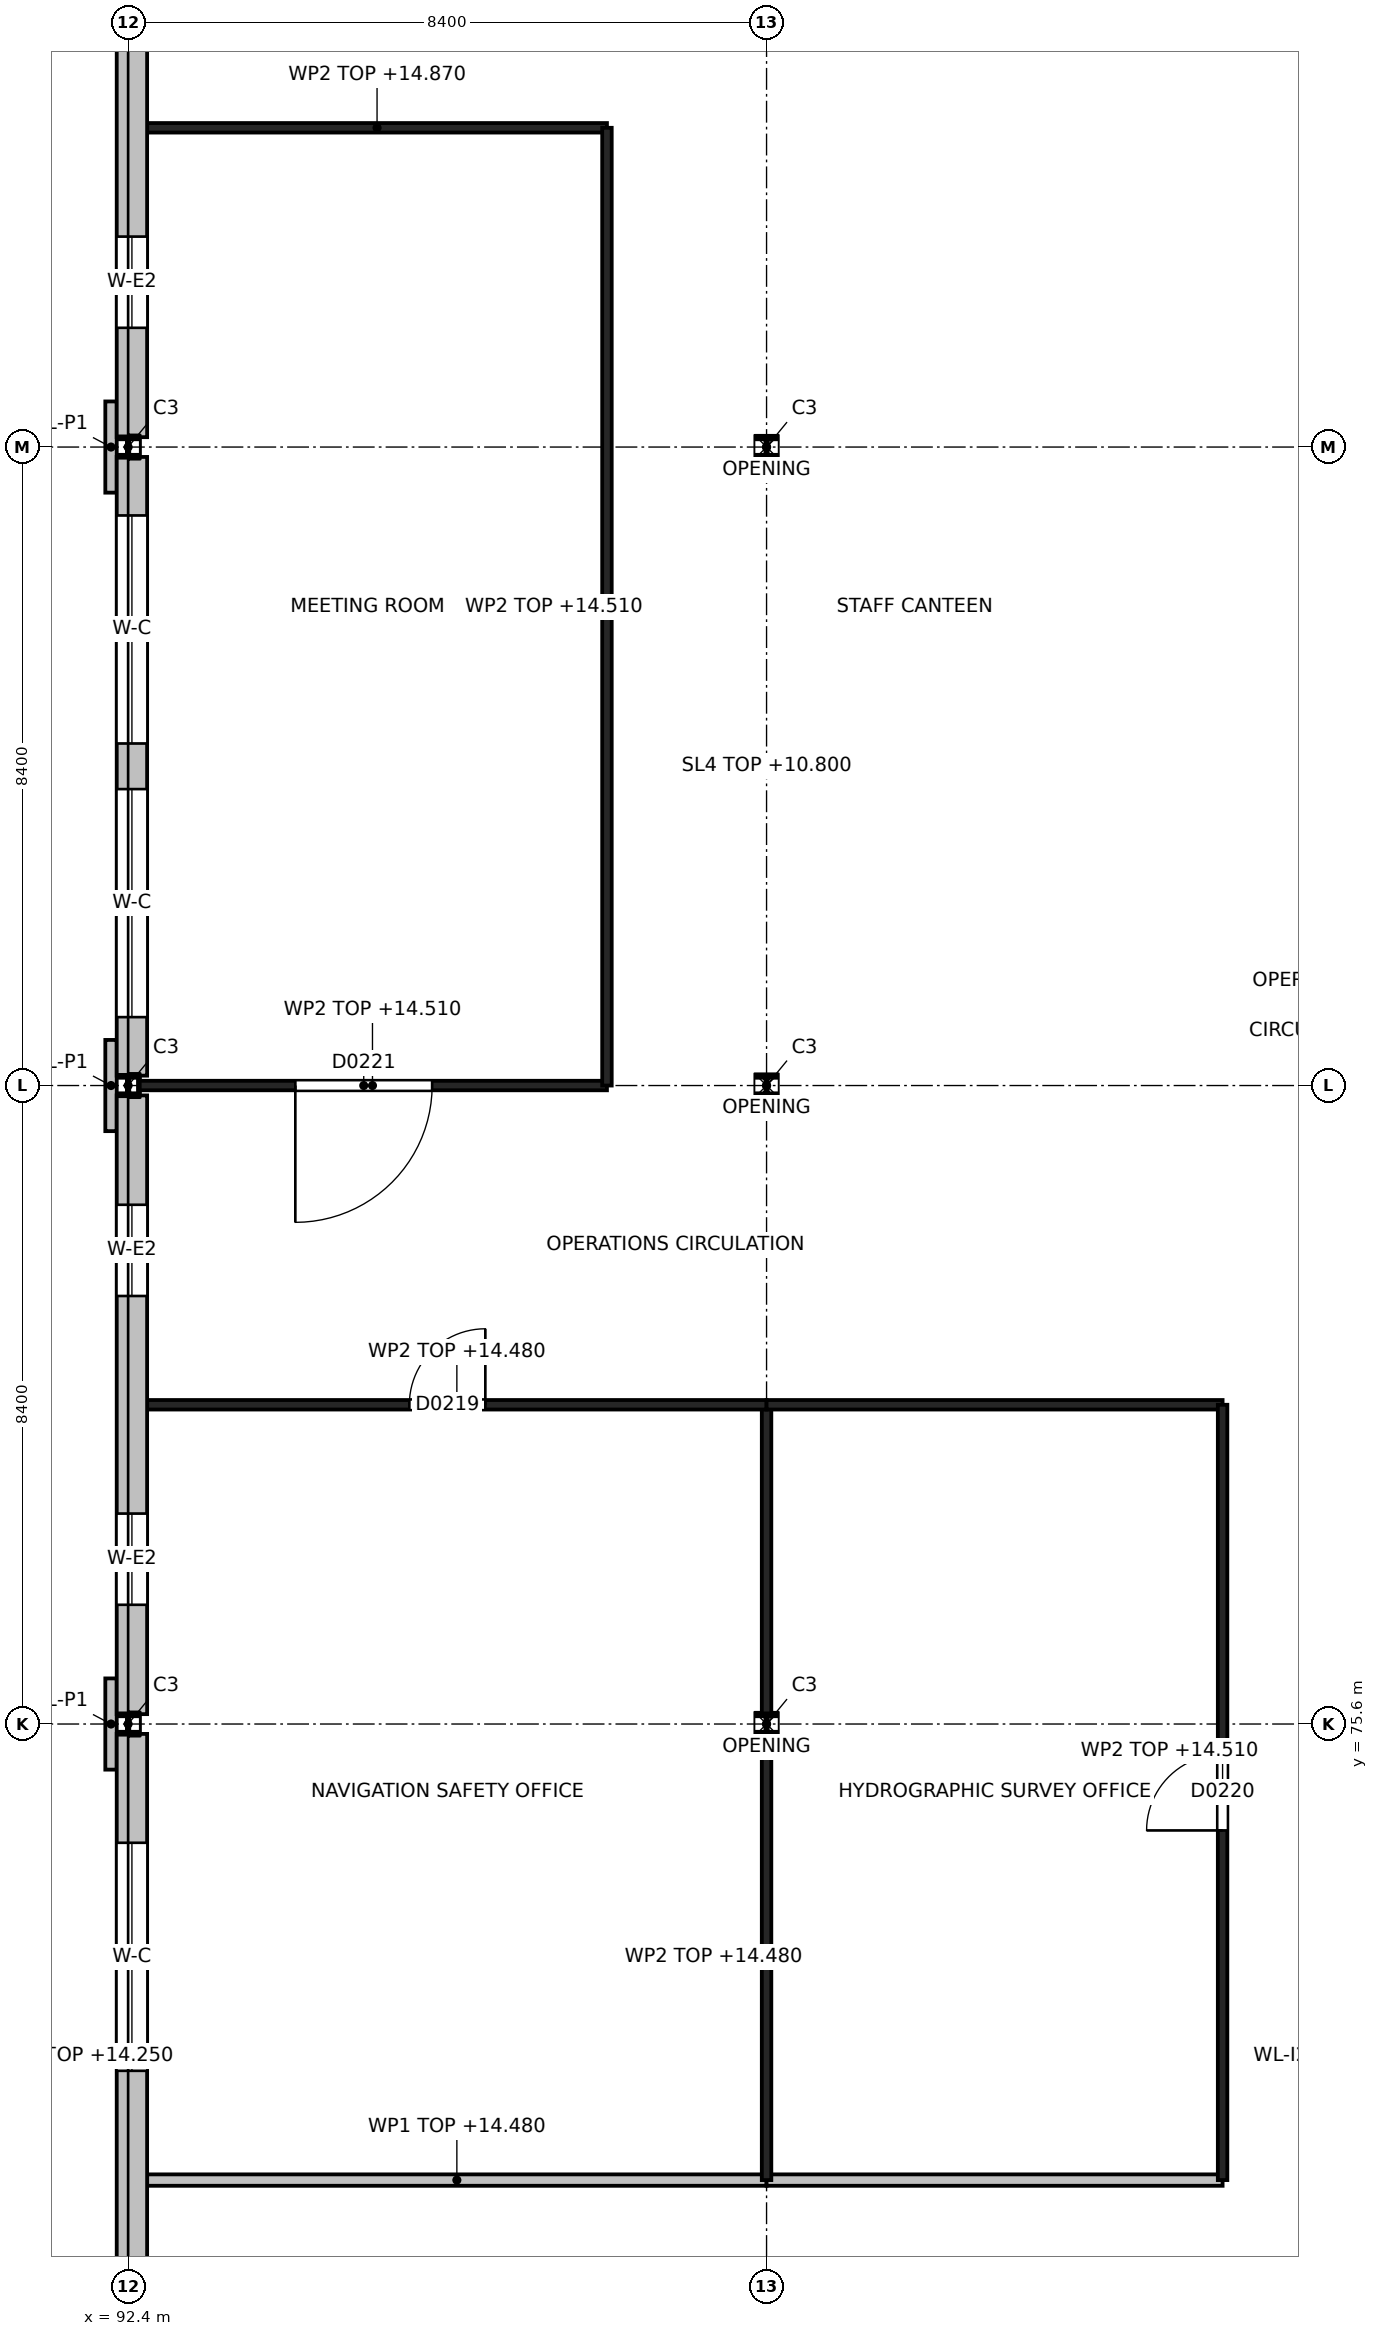
"""IFC4 building model, lengths in metres.
Left out: names, types, materials, properties, quantities, classifications, styles, units other than length and angle.
Written with IfcOpenShell. Run it as: python <this file> out.ifc"""

import sys

from ifc_helpers import new_model, si_unit, direction, frame, frame_2d, origin, origin_2d, place, context, subcontext, project, spatial, rectangle, i_section, extrude, element, fill, save


model = new_model("IFC4")
c1 = context("Model", 3, precision=1e-05, world=origin(), true_north=direction((0.0, 1.0)))
c2 = subcontext(c1, "Body", "Model", "MODEL_VIEW")
j1 = project(units=[si_unit("LENGTHUNIT", "METRE"), si_unit("PLANEANGLEUNIT", "RADIAN")], contexts=[c1])
p1 = place(None, origin())
s1 = spatial("IfcSite", under=j1, at=p1, CompositionType="ELEMENT")
p2 = place(p1, origin())
s2 = spatial("IfcBuilding", under=s1, at=p2, CompositionType="ELEMENT")
p3 = place(p2, frame((0.0, 0.0, 10.8)))
s3 = spatial("IfcBuildingStorey", under=s2, at=p3, CompositionType="ELEMENT", Elevation=10.8)
for number, where, z_axis, x_axis in (
    (1, (92.4, 75.6, 0.0), (0.0, 0.0, 1.0), (1.0, 0.0, 0.0)),
    (2, (92.4, 84.0, 0.0), (0.0, 0.0, 1.0), (1.0, 0.0, 0.0)),
    (3, (92.4, 92.4, 0.0), (0.0, 0.0, 1.0), (1.0, 0.0, 0.0)),
    (4, (100.8, 75.6, 0.0), (0.0, 0.0, 1.0), (1.0, 0.0, 0.0)),
    (5, (100.8, 84.0, 0.0), (0.0, 0.0, 1.0), (1.0, 0.0, 0.0)),
    (6, (100.8, 92.4, 0.0), (0.0, 0.0, 1.0), (1.0, 0.0, 0.0)),
):
    element("IfcColumn", number, at=place(p3, frame(where, z_axis=z_axis, x_axis=x_axis)), inside=s3, PredefinedType="COLUMN", context=c2, shape_type="SweptSolid", body=[
        extrude(i_section(OverallWidth=0.26, OverallDepth=0.26, WebThickness=0.01, FlangeThickness=0.018, at=origin_2d()), origin(), (0.0, 0.0, 1.0), 4.2),
    ])
p4 = place(p3, frame((92.45, 67.0, 0.0), z_axis=(0.0, 0.0, 1.0), x_axis=(0.0, 1.0, 0.0)))
e7 = element("IfcWall", 7, at=p4, inside=s3, PredefinedType="SOLIDWALL", context=c2, shape_type="SweptSolid", body=[
    extrude(rectangle(XDim=8.47, YDim=0.4, at=frame_2d((4.235, 0.0))), origin(), (0.0, 0.0, 1.0), 3.45),
])
p5 = place(p4, frame((4.038, 0.0, 0.9)))
e8 = element("IfcOpeningElement", 8, at=p5, cuts=e7, PredefinedType="OPENING", context=c2, shape_type="SweptSolid", body=[
    extrude(rectangle(XDim=3.0, YDim=2.4, at=frame_2d((1.5, 1.2))), frame((0.0, 0.2, 0.0), z_axis=(0.0, -1.0, 0.0), x_axis=(1.0, 0.0, 0.0)), (0.0, 0.0, 1.0), 0.4),
])
p6 = place(p3, frame((92.45, 75.73, 0.0), z_axis=(0.0, 0.0, 1.0), x_axis=(0.0, 1.0, 0.0)))
e9 = element("IfcWall", 9, at=p6, inside=s3, PredefinedType="SOLIDWALL", context=c2, shape_type="SweptSolid", body=[
    extrude(rectangle(XDim=8.14, YDim=0.4, at=frame_2d((4.07, 0.0))), origin(), (0.0, 0.0, 1.0), 3.45),
])
p7 = place(p6, frame((1.439, 0.0, 0.9)))
e10 = element("IfcOpeningElement", 10, at=p7, cuts=e9, PredefinedType="OPENING", context=c2, shape_type="SweptSolid", body=[
    extrude(rectangle(XDim=1.2, YDim=2.4, at=frame_2d((0.6, 1.2))), frame((0.0, 0.2, 0.0), z_axis=(0.0, -1.0, 0.0), x_axis=(1.0, 0.0, 0.0)), (0.0, 0.0, 1.0), 0.4),
])
p8 = place(p6, frame((5.501, 0.0, 0.9)))
e11 = element("IfcOpeningElement", 11, at=p8, cuts=e9, PredefinedType="OPENING", context=c2, shape_type="SweptSolid", body=[
    extrude(rectangle(XDim=1.2, YDim=2.4, at=frame_2d((0.6, 1.2))), frame((0.0, 0.2, 0.0), z_axis=(0.0, -1.0, 0.0), x_axis=(1.0, 0.0, 0.0)), (0.0, 0.0, 1.0), 0.4),
])
p9 = place(p3, frame((92.45, 84.13, 0.0), z_axis=(0.0, 0.0, 1.0), x_axis=(0.0, 1.0, 0.0)))
e12 = element("IfcWall", 12, at=p9, inside=s3, PredefinedType="SOLIDWALL", context=c2, shape_type="SweptSolid", body=[
    extrude(rectangle(XDim=8.14, YDim=0.4, at=frame_2d((4.07, 0.0))), origin(), (0.0, 0.0, 1.0), 3.45),
])
p10 = place(p9, frame((0.77, 0.0, 0.9)))
e13 = element("IfcOpeningElement", 13, at=p10, cuts=e12, PredefinedType="OPENING", context=c2, shape_type="SweptSolid", body=[
    extrude(rectangle(XDim=3.0, YDim=2.4, at=frame_2d((1.5, 1.2))), frame((0.0, 0.2, 0.0), z_axis=(0.0, -1.0, 0.0), x_axis=(1.0, 0.0, 0.0)), (0.0, 0.0, 1.0), 0.4),
])
p11 = place(p9, frame((4.37, 0.0, 0.9)))
e14 = element("IfcOpeningElement", 14, at=p11, cuts=e12, PredefinedType="OPENING", context=c2, shape_type="SweptSolid", body=[
    extrude(rectangle(XDim=3.0, YDim=2.4, at=frame_2d((1.5, 1.2))), frame((0.0, 0.2, 0.0), z_axis=(0.0, -1.0, 0.0), x_axis=(1.0, 0.0, 0.0)), (0.0, 0.0, 1.0), 0.4),
])
p12 = place(p3, frame((92.45, 92.53, 0.0), z_axis=(0.0, 0.0, 1.0), x_axis=(0.0, 1.0, 0.0)))
e15 = element("IfcWall", 15, at=p12, inside=s3, PredefinedType="SOLIDWALL", context=c2, shape_type="SweptSolid", body=[
    extrude(rectangle(XDim=8.47, YDim=0.4, at=frame_2d((4.235, 0.0))), origin(), (0.0, 0.0, 1.0), 3.45),
])
p13 = place(p12, frame((1.439, 0.0, 0.9)))
e16 = element("IfcOpeningElement", 16, at=p13, cuts=e15, PredefinedType="OPENING", context=c2, shape_type="SweptSolid", body=[
    extrude(rectangle(XDim=1.2, YDim=2.4, at=frame_2d((0.6, 1.2))), frame((0.0, 0.2, 0.0), z_axis=(0.0, -1.0, 0.0), x_axis=(1.0, 0.0, 0.0)), (0.0, 0.0, 1.0), 0.4),
])
p14 = place(p12, frame((5.501, 0.0, 0.9)))
e17 = element("IfcOpeningElement", 17, at=p14, cuts=e15, PredefinedType="OPENING", context=c2, shape_type="SweptSolid", body=[
    extrude(rectangle(XDim=1.2, YDim=2.4, at=frame_2d((0.6, 1.2))), frame((0.0, 0.2, 0.0), z_axis=(0.0, -1.0, 0.0), x_axis=(1.0, 0.0, 0.0)), (0.0, 0.0, 1.0), 0.4),
])
p15 = place(p3, frame((92.175, 75.0, 0.0), z_axis=(0.0, 0.0, 1.0), x_axis=(0.0, 1.0, 0.0)))
e18 = element("IfcWall", 18, at=p15, inside=s3, PredefinedType="SOLIDWALL", context=c2, shape_type="SweptSolid", body=[
    extrude(rectangle(XDim=1.2, YDim=0.15, at=frame_2d((0.6, 0.0))), origin(), (0.0, 0.0, 1.0), 4.2),
])
p16 = place(p3, frame((92.175, 83.4, 0.0), z_axis=(0.0, 0.0, 1.0), x_axis=(0.0, 1.0, 0.0)))
e19 = element("IfcWall", 19, at=p16, inside=s3, PredefinedType="SOLIDWALL", context=c2, shape_type="SweptSolid", body=[
    extrude(rectangle(XDim=1.2, YDim=0.15, at=frame_2d((0.6, 0.0))), origin(), (0.0, 0.0, 1.0), 4.2),
])
p17 = place(p3, frame((92.175, 91.8, 0.0), z_axis=(0.0, 0.0, 1.0), x_axis=(0.0, 1.0, 0.0)))
e20 = element("IfcWall", 20, at=p17, inside=s3, PredefinedType="SOLIDWALL", context=c2, shape_type="SweptSolid", body=[
    extrude(rectangle(XDim=1.2, YDim=0.15, at=frame_2d((0.6, 0.0))), origin(), (0.0, 0.0, 1.0), 4.2),
])
p18 = place(p3, frame((92.65, 69.6, 0.0), z_axis=(0.0, 0.0, 1.0), x_axis=(1.0, 0.0, 0.0)))
e21 = element("IfcWall", 21, at=p18, inside=s3, PredefinedType="PARTITIONING", context=c2, shape_type="SweptSolid", body=[
    extrude(rectangle(XDim=8.15, YDim=0.15, at=frame_2d((4.075, 0.0))), origin(), (0.0, 0.0, 1.0), 3.68),
])
p19 = place(p3, frame((100.8, 69.6, 0.0), z_axis=(0.0, 0.0, 1.0), x_axis=(1.0, 0.0, 0.0)))
e22 = element("IfcWall", 22, at=p19, inside=s3, PredefinedType="PARTITIONING", context=c2, shape_type="SweptSolid", body=[
    extrude(rectangle(XDim=6.0, YDim=0.15, at=frame_2d((3.0, 0.0))), origin(), (0.0, 0.0, 1.0), 3.68),
])
p20 = place(p3, frame((100.8, 69.6, 0.0), z_axis=(0.0, 0.0, 1.0), x_axis=(0.0, 1.0, 0.0)))
e23 = element("IfcWall", 23, at=p20, inside=s3, PredefinedType="PARTITIONING", context=c2, shape_type="SweptSolid", body=[
    extrude(rectangle(XDim=5.87, YDim=0.125, at=frame_2d((2.935, 0.0))), origin(), (0.0, 0.0, 1.0), 3.68),
])
p21 = place(p3, frame((100.8, 75.73, 0.0), z_axis=(0.0, 0.0, 1.0), x_axis=(0.0, 1.0, 0.0)))
e24 = element("IfcWall", 24, at=p21, inside=s3, PredefinedType="PARTITIONING", context=c2, shape_type="SweptSolid", body=[
    extrude(rectangle(XDim=4.07, YDim=0.125, at=frame_2d((2.035, 0.0))), origin(), (0.0, 0.0, 1.0), 3.68),
])
p22 = place(p3, frame((92.65, 79.8, 0.0), z_axis=(0.0, 0.0, 1.0), x_axis=(1.0, 0.0, 0.0)))
e25 = element("IfcWall", 25, at=p22, inside=s3, PredefinedType="PARTITIONING", context=c2, shape_type="SweptSolid", body=[
    extrude(rectangle(XDim=8.15, YDim=0.125, at=frame_2d((4.075, 0.0))), origin(), (0.0, 0.0, 1.0), 3.68),
])
p23 = place(p22, frame((3.449, 0.0, 0.0)))
e26 = element("IfcOpeningElement", 26, at=p23, cuts=e25, PredefinedType="OPENING", context=c2, shape_type="SweptSolid", body=[
    extrude(rectangle(XDim=1.0, YDim=2.2, at=frame_2d((0.5, 1.1))), frame((0.0, 0.062, 0.0), z_axis=(0.0, -1.0, 0.0), x_axis=(1.0, 0.0, 0.0)), (0.0, 0.0, 1.0), 0.125),
])
p24 = place(p3, frame((100.8, 79.8, 0.0), z_axis=(0.0, 0.0, 1.0), x_axis=(1.0, 0.0, 0.0)))
e27 = element("IfcWall", 27, at=p24, inside=s3, PredefinedType="PARTITIONING", context=c2, shape_type="SweptSolid", body=[
    extrude(rectangle(XDim=6.0, YDim=0.125, at=frame_2d((3.0, 0.0))), origin(), (0.0, 0.0, 1.0), 3.68),
])
p25 = place(p3, frame((106.8, 69.6, 0.0), z_axis=(0.0, 0.0, 1.0), x_axis=(0.0, 1.0, 0.0)))
e28 = element("IfcWall", 28, at=p25, inside=s3, PredefinedType="PARTITIONING", context=c2, shape_type="SweptSolid", body=[
    extrude(rectangle(XDim=10.2, YDim=0.125, at=frame_2d((5.1, 0.0))), origin(), (0.0, 0.0, 1.0), 3.71),
])
p26 = place(p25, frame((4.6, 0.0, 0.0)))
e29 = element("IfcOpeningElement", 29, at=p26, cuts=e28, PredefinedType="OPENING", context=c2, shape_type="SweptSolid", body=[
    extrude(rectangle(XDim=1.0, YDim=2.2, at=frame_2d((0.5, 1.1))), frame((0.0, 0.062, 0.0), z_axis=(0.0, -1.0, 0.0), x_axis=(1.0, 0.0, 0.0)), (0.0, 0.0, 1.0), 0.125),
])
p27 = place(p3, frame((92.53, 84.0, 0.0), z_axis=(0.0, 0.0, 1.0), x_axis=(1.0, 0.0, 0.0)))
e30 = element("IfcWall", 30, at=p27, inside=s3, PredefinedType="PARTITIONING", context=c2, shape_type="SweptSolid", body=[
    extrude(rectangle(XDim=6.17, YDim=0.125, at=frame_2d((3.085, 0.0))), origin(), (0.0, 0.0, 1.0), 3.71),
])
p28 = place(p27, frame((2.07, 0.0, 0.0)))
e31 = element("IfcOpeningElement", 31, at=p28, cuts=e30, PredefinedType="OPENING", context=c2, shape_type="SweptSolid", body=[
    extrude(rectangle(XDim=1.8, YDim=2.1, at=frame_2d((0.9, 1.05))), frame((0.0, 0.062, 0.0), z_axis=(0.0, -1.0, 0.0), x_axis=(1.0, 0.0, 0.0)), (0.0, 0.0, 1.0), 0.125),
])
p29 = place(p3, frame((92.65, 96.6, 0.0), z_axis=(0.0, 0.0, 1.0), x_axis=(1.0, 0.0, 0.0)))
e32 = element("IfcWall", 32, at=p29, inside=s3, PredefinedType="PARTITIONING", context=c2, shape_type="SweptSolid", body=[
    extrude(rectangle(XDim=6.05, YDim=0.125, at=frame_2d((3.025, 0.0))), origin(), (0.0, 0.0, 1.0), 4.07),
])
p30 = place(p3, frame((98.7, 84.0, 0.0), z_axis=(0.0, 0.0, 1.0), x_axis=(0.0, 1.0, 0.0)))
e33 = element("IfcWall", 33, at=p30, inside=s3, PredefinedType="PARTITIONING", context=c2, shape_type="SweptSolid", body=[
    extrude(rectangle(XDim=12.6, YDim=0.125, at=frame_2d((6.3, 0.0))), origin(), (0.0, 0.0, 1.0), 3.71),
])
p31 = place(p5, origin())
e34 = element("IfcWindow", 34, at=p31, inside=s3, PartitioningType="SINGLE_PANEL", PredefinedType="WINDOW", context=c2, shape_type="SweptSolid", body=[
    extrude(rectangle(XDim=3.0, YDim=2.4, at=frame_2d((1.5, 1.2))), frame((0.0, 0.03, 0.0), z_axis=(0.0, -1.0, 0.0), x_axis=(1.0, 0.0, 0.0)), (0.0, 0.0, 1.0), 0.06),
])
fill(e8, e34)
p32 = place(p7, origin())
e35 = element("IfcWindow", 35, at=p32, inside=s3, PartitioningType="SINGLE_PANEL", PredefinedType="WINDOW", context=c2, shape_type="SweptSolid", body=[
    extrude(rectangle(XDim=1.2, YDim=2.4, at=frame_2d((0.6, 1.2))), frame((0.0, 0.03, 0.0), z_axis=(0.0, -1.0, 0.0), x_axis=(1.0, 0.0, 0.0)), (0.0, 0.0, 1.0), 0.06),
])
fill(e10, e35)
p33 = place(p8, origin())
e36 = element("IfcWindow", 36, at=p33, inside=s3, PartitioningType="SINGLE_PANEL", PredefinedType="WINDOW", context=c2, shape_type="SweptSolid", body=[
    extrude(rectangle(XDim=1.2, YDim=2.4, at=frame_2d((0.6, 1.2))), frame((0.0, 0.03, 0.0), z_axis=(0.0, -1.0, 0.0), x_axis=(1.0, 0.0, 0.0)), (0.0, 0.0, 1.0), 0.06),
])
fill(e11, e36)
p34 = place(p10, origin())
e37 = element("IfcWindow", 37, at=p34, inside=s3, PartitioningType="SINGLE_PANEL", PredefinedType="WINDOW", context=c2, shape_type="SweptSolid", body=[
    extrude(rectangle(XDim=3.0, YDim=2.4, at=frame_2d((1.5, 1.2))), frame((0.0, 0.03, 0.0), z_axis=(0.0, -1.0, 0.0), x_axis=(1.0, 0.0, 0.0)), (0.0, 0.0, 1.0), 0.06),
])
fill(e13, e37)
p35 = place(p11, origin())
e38 = element("IfcWindow", 38, at=p35, inside=s3, PartitioningType="SINGLE_PANEL", PredefinedType="WINDOW", context=c2, shape_type="SweptSolid", body=[
    extrude(rectangle(XDim=3.0, YDim=2.4, at=frame_2d((1.5, 1.2))), frame((0.0, 0.03, 0.0), z_axis=(0.0, -1.0, 0.0), x_axis=(1.0, 0.0, 0.0)), (0.0, 0.0, 1.0), 0.06),
])
fill(e14, e38)
p36 = place(p13, origin())
e39 = element("IfcWindow", 39, at=p36, inside=s3, PartitioningType="SINGLE_PANEL", PredefinedType="WINDOW", context=c2, shape_type="SweptSolid", body=[
    extrude(rectangle(XDim=1.2, YDim=2.4, at=frame_2d((0.6, 1.2))), frame((0.0, 0.03, 0.0), z_axis=(0.0, -1.0, 0.0), x_axis=(1.0, 0.0, 0.0)), (0.0, 0.0, 1.0), 0.06),
])
fill(e16, e39)
p37 = place(p23, origin())
e40 = element("IfcDoor", 40, at=p37, inside=s3, OperationType="SINGLE_SWING_RIGHT", PredefinedType="DOOR", context=c2, shape_type="SweptSolid", body=[
    extrude(rectangle(XDim=1.0, YDim=2.2, at=frame_2d((0.5, 1.1))), frame((0.0, 0.025, 0.0), z_axis=(0.0, -1.0, 0.0), x_axis=(1.0, 0.0, 0.0)), (0.0, 0.0, 1.0), 0.05),
])
fill(e26, e40)
p38 = place(p26, origin())
e41 = element("IfcDoor", 41, at=p38, inside=s3, OperationType="SINGLE_SWING_LEFT", PredefinedType="DOOR", context=c2, shape_type="SweptSolid", body=[
    extrude(rectangle(XDim=1.0, YDim=2.2, at=frame_2d((0.5, 1.1))), frame((0.0, 0.025, 0.0), z_axis=(0.0, -1.0, 0.0), x_axis=(1.0, 0.0, 0.0)), (0.0, 0.0, 1.0), 0.05),
])
fill(e29, e41)
p39 = place(p28, origin())
e42 = element("IfcDoor", 42, at=p39, inside=s3, OperationType="DOUBLE_DOOR_DOUBLE_SWING", PredefinedType="DOOR", context=c2, shape_type="SweptSolid", body=[
    extrude(rectangle(XDim=1.8, YDim=2.1, at=frame_2d((0.9, 1.05))), frame((0.0, 0.025, 0.0), z_axis=(0.0, -1.0, 0.0), x_axis=(1.0, 0.0, 0.0)), (0.0, 0.0, 1.0), 0.05),
])
fill(e31, e42)
save(model, sys.argv[1])
